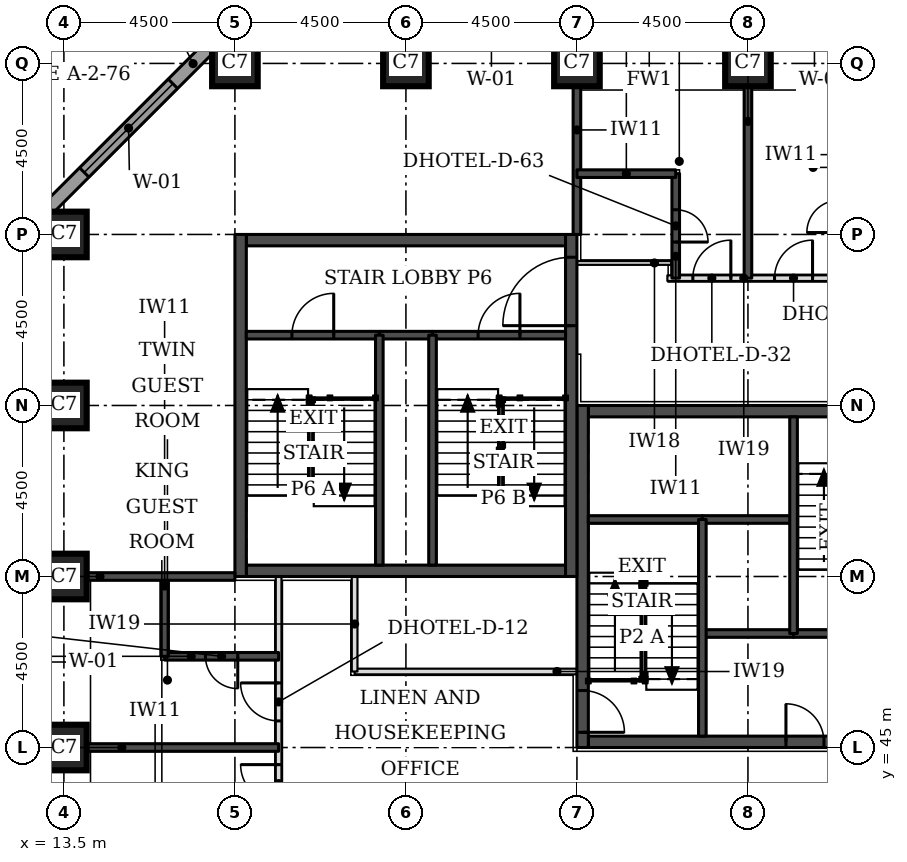
"""IFC4 building model, lengths in metres.
Left out: names, types, materials, properties, quantities, classifications, styles, units other than length and angle.
Written with IfcOpenShell. Run it as: python <this file> out.ifc"""

import sys

from ifc_helpers import new_model, si_unit, direction, frame, frame_2d, origin, origin_2d, place, context, subcontext, project, spatial, rectangle, extrude, element, fill, save


model = new_model("IFC4")
c1 = context("Model", 3, precision=1e-05, world=origin(), true_north=direction((0.0, 1.0)))
c2 = subcontext(c1, "Body", "Model", "MODEL_VIEW")
j1 = project(units=[si_unit("LENGTHUNIT", "METRE"), si_unit("PLANEANGLEUNIT", "RADIAN")], contexts=[c1])
p1 = place(None, origin())
s1 = spatial("IfcSite", under=j1, at=p1, CompositionType="ELEMENT")
p2 = place(p1, origin())
s2 = spatial("IfcBuilding", under=s1, at=p2, CompositionType="ELEMENT")
p3 = place(p2, frame((0.0, 0.0, 36.3)))
s3 = spatial("IfcBuildingStorey", under=s2, at=p3, CompositionType="ELEMENT", Elevation=36.3)
for number, where, z_axis, x_axis in (
    (1, (13.5, 45.0, 0.0), (0.0, 0.0, 1.0), (1.0, 0.0, 0.0)),
    (2, (13.5, 49.5, 0.0), (0.0, 0.0, 1.0), (1.0, 0.0, 0.0)),
    (3, (13.5, 54.0, 0.0), (0.0, 0.0, 1.0), (1.0, 0.0, 0.0)),
    (4, (13.5, 58.5, 0.0), (0.0, 0.0, 1.0), (1.0, 0.0, 0.0)),
    (5, (18.0, 63.0, 0.0), (0.0, 0.0, 1.0), (1.0, 0.0, 0.0)),
    (6, (22.5, 63.0, 0.0), (0.0, 0.0, 1.0), (1.0, 0.0, 0.0)),
    (7, (27.0, 63.0, 0.0), (0.0, 0.0, 1.0), (1.0, 0.0, 0.0)),
    (8, (31.5, 63.0, 0.0), (0.0, 0.0, 1.0), (1.0, 0.0, 0.0)),
):
    element("IfcColumn", number, at=place(p3, frame(where, z_axis=z_axis, x_axis=x_axis)), inside=s3, PredefinedType="COLUMN", context=c2, shape_type="SweptSolid", body=[
        extrude(rectangle(XDim=1.2, YDim=1.2, at=origin_2d()), origin(), (0.0, 0.0, 1.0), 3.3),
    ])
p4 = place(p3, frame((27.3, 45.15, 0.0), z_axis=(0.0, 0.0, 1.0), x_axis=(1.0, 0.0, 0.0)))
e9 = element("IfcWall", 9, at=p4, inside=s3, PredefinedType="SHEAR", context=c2, shape_type="SweptSolid", body=[
    extrude(rectangle(XDim=8.4, YDim=0.3, at=frame_2d((4.2, 0.0))), origin(), (0.0, 0.0, 1.0), 3.3),
])
p5 = place(p4, frame((5.2, 0.0, 0.0)))
e10 = element("IfcOpeningElement", 10, at=p5, cuts=e9, PredefinedType="OPENING", context=c2, shape_type="SweptSolid", body=[
    extrude(rectangle(XDim=1.0, YDim=2.1, at=frame_2d((0.5, 1.05))), frame((0.0, 0.16, 0.0), z_axis=(0.0, -1.0, 0.0), x_axis=(1.0, 0.0, 0.0)), (0.0, 0.0, 1.0), 0.32),
])
p6 = place(p3, frame((27.3, 53.85, 0.0), z_axis=(0.0, 0.0, 1.0), x_axis=(1.0, 0.0, 0.0)))
e11 = element("IfcWall", 11, at=p6, inside=s3, PredefinedType="SHEAR", context=c2, shape_type="SweptSolid", body=[
    extrude(rectangle(XDim=8.4, YDim=0.3, at=frame_2d((4.2, 0.0))), origin(), (0.0, 0.0, 1.0), 3.3),
])
p7 = place(p6, frame((6.4, 0.0, 0.0)))
e12 = element("IfcOpeningElement", 12, at=p7, cuts=e11, PredefinedType="OPENING", context=c2, shape_type="SweptSolid", body=[
    extrude(rectangle(XDim=1.1, YDim=2.1, at=frame_2d((0.55, 1.05))), frame((0.0, 0.16, 0.0), z_axis=(0.0, -1.0, 0.0), x_axis=(1.0, 0.0, 0.0)), (0.0, 0.0, 1.0), 0.32),
])
p8 = place(p3, frame((27.15, 45.0, 0.0), z_axis=(0.0, 0.0, 1.0), x_axis=(0.0, 1.0, 0.0)))
e13 = element("IfcWall", 13, at=p8, inside=s3, PredefinedType="SHEAR", context=c2, shape_type="SweptSolid", body=[
    extrude(rectangle(XDim=9.0, YDim=0.3, at=frame_2d((4.5, 0.0))), origin(), (0.0, 0.0, 1.0), 3.3),
])
p9 = place(p8, frame((0.4, 0.0, 0.0)))
e14 = element("IfcOpeningElement", 14, at=p9, cuts=e13, PredefinedType="OPENING", context=c2, shape_type="SweptSolid", body=[
    extrude(rectangle(XDim=1.1, YDim=2.1, at=frame_2d((0.55, 1.05))), frame((0.0, 0.16, 0.0), z_axis=(0.0, -1.0, 0.0), x_axis=(1.0, 0.0, 0.0)), (0.0, 0.0, 1.0), 0.32),
])
for number, where, z_axis, x_axis in (
    (15, (18.3, 49.65, 0.0), (0.0, 0.0, 1.0), (1.0, 0.0, 0.0)),
    (16, (18.3, 58.35, 0.0), (0.0, 0.0, 1.0), (1.0, 0.0, 0.0)),
):
    element("IfcWall", number, at=place(p3, frame(where, z_axis=z_axis, x_axis=x_axis)), inside=s3, PredefinedType="SHEAR", context=c2, shape_type="SweptSolid", body=[
        extrude(rectangle(XDim=8.4, YDim=0.3, at=frame_2d((4.2, 0.0))), origin(), (0.0, 0.0, 1.0), 3.3),
    ])
p10 = place(p3, frame((18.15, 49.5, 0.0), z_axis=(0.0, 0.0, 1.0), x_axis=(0.0, 1.0, 0.0)))
e17 = element("IfcWall", 17, at=p10, inside=s3, PredefinedType="SHEAR", context=c2, shape_type="SweptSolid", body=[
    extrude(rectangle(XDim=9.0, YDim=0.3, at=frame_2d((4.5, 0.0))), origin(), (0.0, 0.0, 1.0), 3.3),
])
p11 = place(p3, frame((26.85, 49.5, 0.0), z_axis=(0.0, 0.0, 1.0), x_axis=(0.0, 1.0, 0.0)))
e18 = element("IfcWall", 18, at=p11, inside=s3, PredefinedType="SHEAR", context=c2, shape_type="SweptSolid", body=[
    extrude(rectangle(XDim=9.0, YDim=0.3, at=frame_2d((4.5, 0.0))), origin(), (0.0, 0.0, 1.0), 3.3),
])
p12 = place(p11, frame((6.6, 0.0, 0.0)))
e19 = element("IfcOpeningElement", 19, at=p12, cuts=e18, PredefinedType="OPENING", context=c2, shape_type="SweptSolid", body=[
    extrude(rectangle(XDim=1.8, YDim=2.1, at=frame_2d((0.9, 1.05))), frame((0.0, 0.16, 0.0), z_axis=(0.0, -1.0, 0.0), x_axis=(1.0, 0.0, 0.0)), (0.0, 0.0, 1.0), 0.32),
])
p13 = place(p3, frame((17.73, 63.826, 0.0), z_axis=(0.0, 0.0, 1.0), x_axis=(-0.707106781187, -0.707106781187, 0.0)))
e20 = element("IfcWall", 20, at=p13, inside=s3, PredefinedType="STANDARD", context=c2, shape_type="SweptSolid", body=[
    extrude(rectangle(XDim=7.151, YDim=0.35, at=frame_2d((3.576, 0.0))), origin(), (0.0, 0.0, 1.0), 3.055),
])
p14 = place(p13, frame((1.926, 0.0, 0.8)))
e21 = element("IfcOpeningElement", 21, at=p14, cuts=e20, PredefinedType="OPENING", context=c2, shape_type="SweptSolid", body=[
    extrude(rectangle(XDim=3.3, YDim=1.5, at=frame_2d((1.65, 0.75))), frame((0.0, 0.185, 0.0), z_axis=(0.0, -1.0, 0.0), x_axis=(1.0, 0.0, 0.0)), (0.0, 0.0, 1.0), 0.37),
])
p15 = place(p3, frame((19.15, 25.15, 0.0), z_axis=(0.0, 0.0, 1.0), x_axis=(0.0, 1.0, 0.0)))
e22 = element("IfcWall", 22, at=p15, inside=s3, PredefinedType="PARTITIONING", context=c2, shape_type="SweptSolid", body=[
    extrude(rectangle(XDim=24.35, YDim=0.15, at=frame_2d((12.175, 0.0))), origin(), (0.0, 0.0, 1.0), 3.08),
])
p16 = place(p15, frame((0.4, 0.0, 0.0)))
e23 = element("IfcOpeningElement", 23, at=p16, cuts=e22, PredefinedType="OPENING", context=c2, shape_type="SweptSolid", body=[
    extrude(rectangle(XDim=1.0, YDim=2.1, at=frame_2d((0.5, 1.05))), frame((0.0, 0.085, 0.0), z_axis=(0.0, -1.0, 0.0), x_axis=(1.0, 0.0, 0.0)), (0.0, 0.0, 1.0), 0.17),
])
p17 = place(p15, frame((2.55, 0.0, 0.0)))
e24 = element("IfcOpeningElement", 24, at=p17, cuts=e22, PredefinedType="OPENING", context=c2, shape_type="SweptSolid", body=[
    extrude(rectangle(XDim=1.0, YDim=2.1, at=frame_2d((0.5, 1.05))), frame((0.0, 0.085, 0.0), z_axis=(0.0, -1.0, 0.0), x_axis=(1.0, 0.0, 0.0)), (0.0, 0.0, 1.0), 0.17),
])
p18 = place(p15, frame((9.4, 0.0, 0.0)))
e25 = element("IfcOpeningElement", 25, at=p18, cuts=e22, PredefinedType="OPENING", context=c2, shape_type="SweptSolid", body=[
    extrude(rectangle(XDim=1.0, YDim=2.1, at=frame_2d((0.5, 1.05))), frame((0.0, 0.085, 0.0), z_axis=(0.0, -1.0, 0.0), x_axis=(1.0, 0.0, 0.0)), (0.0, 0.0, 1.0), 0.17),
])
p19 = place(p15, frame((11.55, 0.0, 0.0)))
e26 = element("IfcOpeningElement", 26, at=p19, cuts=e22, PredefinedType="OPENING", context=c2, shape_type="SweptSolid", body=[
    extrude(rectangle(XDim=1.0, YDim=2.1, at=frame_2d((0.5, 1.05))), frame((0.0, 0.085, 0.0), z_axis=(0.0, -1.0, 0.0), x_axis=(1.0, 0.0, 0.0)), (0.0, 0.0, 1.0), 0.17),
])
p20 = place(p15, frame((18.4, 0.0, 0.0)))
e27 = element("IfcOpeningElement", 27, at=p20, cuts=e22, PredefinedType="OPENING", context=c2, shape_type="SweptSolid", body=[
    extrude(rectangle(XDim=1.0, YDim=2.1, at=frame_2d((0.5, 1.05))), frame((0.0, 0.085, 0.0), z_axis=(0.0, -1.0, 0.0), x_axis=(1.0, 0.0, 0.0)), (0.0, 0.0, 1.0), 0.17),
])
p21 = place(p15, frame((20.55, 0.0, 0.0)))
e28 = element("IfcOpeningElement", 28, at=p21, cuts=e22, PredefinedType="OPENING", context=c2, shape_type="SweptSolid", body=[
    extrude(rectangle(XDim=1.0, YDim=2.1, at=frame_2d((0.5, 1.05))), frame((0.0, 0.085, 0.0), z_axis=(0.0, -1.0, 0.0), x_axis=(1.0, 0.0, 0.0)), (0.0, 0.0, 1.0), 0.17),
])
p22 = place(p3, frame((21.15, 47.0, 0.0), z_axis=(0.0, 0.0, 1.0), x_axis=(1.0, 0.0, 0.0)))
e29 = element("IfcWall", 29, at=p22, inside=s3, PredefinedType="PARTITIONING", context=c2, shape_type="SweptSolid", body=[
    extrude(rectangle(XDim=5.85, YDim=0.15, at=frame_2d((2.925, 0.0))), origin(), (0.0, 0.0, 1.0), 3.08),
])
p23 = place(p3, frame((21.15, 47.0, 0.0), z_axis=(0.0, 0.0, 1.0), x_axis=(0.0, 1.0, 0.0)))
e30 = element("IfcWall", 30, at=p23, inside=s3, PredefinedType="PARTITIONING", context=c2, shape_type="SweptSolid", body=[
    extrude(rectangle(XDim=2.5, YDim=0.15, at=frame_2d((1.25, 0.0))), origin(), (0.0, 0.0, 1.0), 3.08),
])
p24 = place(p3, frame((29.38, 57.35, 0.0), z_axis=(0.0, 0.0, 1.0), x_axis=(1.0, 0.0, 0.0)))
e31 = element("IfcWall", 31, at=p24, inside=s3, PredefinedType="PARTITIONING", context=c2, shape_type="SweptSolid", body=[
    extrude(rectangle(XDim=13.62, YDim=0.15, at=frame_2d((6.81, 0.0))), origin(), (0.0, 0.0, 1.0), 3.08),
])
p25 = place(p24, frame((2.82, 0.0, 0.0)))
e32 = element("IfcOpeningElement", 32, at=p25, cuts=e31, PredefinedType="OPENING", context=c2, shape_type="SweptSolid", body=[
    extrude(rectangle(XDim=1.0, YDim=2.1, at=frame_2d((0.5, 1.05))), frame((0.0, 0.085, 0.0), z_axis=(0.0, -1.0, 0.0), x_axis=(1.0, 0.0, 0.0)), (0.0, 0.0, 1.0), 0.17),
])
p26 = place(p24, frame((0.67, 0.0, 0.0)))
e33 = element("IfcOpeningElement", 33, at=p26, cuts=e31, PredefinedType="OPENING", context=c2, shape_type="SweptSolid", body=[
    extrude(rectangle(XDim=1.0, YDim=2.1, at=frame_2d((0.5, 1.05))), frame((0.0, 0.085, 0.0), z_axis=(0.0, -1.0, 0.0), x_axis=(1.0, 0.0, 0.0)), (0.0, 0.0, 1.0), 0.17),
])
p27 = place(p24, frame((9.67, 0.0, 0.0)))
e34 = element("IfcOpeningElement", 34, at=p27, cuts=e31, PredefinedType="OPENING", context=c2, shape_type="SweptSolid", body=[
    extrude(rectangle(XDim=0.9, YDim=2.1, at=frame_2d((0.45, 1.05))), frame((0.0, 0.085, 0.0), z_axis=(0.0, -1.0, 0.0), x_axis=(1.0, 0.0, 0.0)), (0.0, 0.0, 1.0), 0.17),
])
p28 = place(p3, frame((14.1, 45.0, 0.0), z_axis=(0.0, 0.0, 1.0), x_axis=(1.0, 0.0, 0.0)))
e35 = element("IfcWall", 35, at=p28, inside=s3, PredefinedType="SOLIDWALL", context=c2, shape_type="SweptSolid", body=[
    extrude(rectangle(XDim=5.05, YDim=0.2, at=frame_2d((2.525, 0.0))), origin(), (0.0, 0.0, 1.0), 3.08),
])
p29 = place(p3, frame((16.15, 47.4, 0.0), z_axis=(0.0, 0.0, 1.0), x_axis=(1.0, 0.0, 0.0)))
e36 = element("IfcWall", 36, at=p29, inside=s3, PredefinedType="SOLIDWALL", context=c2, shape_type="SweptSolid", body=[
    extrude(rectangle(XDim=3.0, YDim=0.2, at=frame_2d((1.5, 0.0))), origin(), (0.0, 0.0, 1.0), 3.08),
])
p30 = place(p29, frame((1.075, 0.0, 0.0)))
e37 = element("IfcOpeningElement", 37, at=p30, cuts=e36, PredefinedType="OPENING", context=c2, shape_type="SweptSolid", body=[
    extrude(rectangle(XDim=0.85, YDim=2.1, at=frame_2d((0.425, 1.05))), frame((0.0, 0.11, 0.0), z_axis=(0.0, -1.0, 0.0), x_axis=(1.0, 0.0, 0.0)), (0.0, 0.0, 1.0), 0.22),
])
p31 = place(p3, frame((16.15, 47.4, 0.0), z_axis=(0.0, 0.0, 1.0), x_axis=(0.0, 1.0, 0.0)))
e38 = element("IfcWall", 38, at=p31, inside=s3, PredefinedType="SOLIDWALL", context=c2, shape_type="SweptSolid", body=[
    extrude(rectangle(XDim=2.1, YDim=0.2, at=frame_2d((1.05, 0.0))), origin(), (0.0, 0.0, 1.0), 3.08),
])
for number, where, z_axis, x_axis in (
    (39, (14.1, 49.5, 0.0), (0.0, 0.0, 1.0), (1.0, 0.0, 0.0)),
    (40, (27.0, 58.5, 0.0), (0.0, 0.0, 1.0), (0.0, 1.0, 0.0)),
):
    element("IfcWall", number, at=place(p3, frame(where, z_axis=z_axis, x_axis=x_axis)), inside=s3, PredefinedType="SOLIDWALL", context=c2, shape_type="SweptSolid", body=[
        extrude(rectangle(XDim=3.9, YDim=0.2, at=frame_2d((1.95, 0.0))), origin(), (0.0, 0.0, 1.0), 3.08),
    ])
p32 = place(p3, frame((29.6, 57.35, 0.0), z_axis=(0.0, 0.0, 1.0), x_axis=(0.0, 1.0, 0.0)))
e41 = element("IfcWall", 41, at=p32, inside=s3, PredefinedType="SOLIDWALL", context=c2, shape_type="SweptSolid", body=[
    extrude(rectangle(XDim=2.75, YDim=0.2, at=frame_2d((1.375, 0.0))), origin(), (0.0, 0.0, 1.0), 3.08),
])
p33 = place(p32, frame((0.95, 0.0, 0.0)))
e42 = element("IfcOpeningElement", 42, at=p33, cuts=e41, PredefinedType="OPENING", context=c2, shape_type="SweptSolid", body=[
    extrude(rectangle(XDim=0.85, YDim=2.1, at=frame_2d((0.425, 1.05))), frame((0.0, 0.11, 0.0), z_axis=(0.0, -1.0, 0.0), x_axis=(1.0, 0.0, 0.0)), (0.0, 0.0, 1.0), 0.22),
])
p34 = place(p3, frame((31.5, 57.35, 0.0), z_axis=(0.0, 0.0, 1.0), x_axis=(0.0, 1.0, 0.0)))
e43 = element("IfcWall", 43, at=p34, inside=s3, PredefinedType="SOLIDWALL", context=c2, shape_type="SweptSolid", body=[
    extrude(rectangle(XDim=5.05, YDim=0.2, at=frame_2d((2.525, 0.0))), origin(), (0.0, 0.0, 1.0), 3.08),
])
p35 = place(p3, frame((27.0, 60.1, 0.0), z_axis=(0.0, 0.0, 1.0), x_axis=(1.0, 0.0, 0.0)))
e44 = element("IfcWall", 44, at=p35, inside=s3, PredefinedType="SOLIDWALL", context=c2, shape_type="SweptSolid", body=[
    extrude(rectangle(XDim=2.6, YDim=0.2, at=frame_2d((1.3, 0.0))), origin(), (0.0, 0.0, 1.0), 3.08),
])
p36 = place(p3, frame((27.0, 57.75, 0.0), z_axis=(0.0, 0.0, 1.0), x_axis=(1.0, 0.0, 0.0)))
e45 = element("IfcWall", 45, at=p36, inside=s3, PredefinedType="PARTITIONING", context=c2, shape_type="SweptSolid", body=[
    extrude(rectangle(XDim=2.48, YDim=0.1, at=frame_2d((1.24, 0.0))), origin(), (0.0, 0.0, 1.0), 3.08),
])
p37 = place(p3, frame((30.3, 48.0, 0.0), z_axis=(0.0, 0.0, 1.0), x_axis=(1.0, 0.0, 0.0)))
e46 = element("IfcWall", 46, at=p37, inside=s3, PredefinedType="SOLIDWALL", context=c2, shape_type="SweptSolid", body=[
    extrude(rectangle(XDim=2.4, YDim=0.2, at=frame_2d((1.2, 0.0))), origin(), (0.0, 0.0, 1.0), 3.08),
])
p38 = place(p3, frame((32.7, 48.0, 0.0), z_axis=(0.0, 0.0, 1.0), x_axis=(1.0, 0.0, 0.0)))
e47 = element("IfcWall", 47, at=p38, inside=s3, PredefinedType="SOLIDWALL", context=c2, shape_type="SweptSolid", body=[
    extrude(rectangle(XDim=3.0, YDim=0.2, at=frame_2d((1.5, 0.0))), origin(), (0.0, 0.0, 1.0), 3.08),
])
p39 = place(p3, frame((30.3, 51.0, 0.0), z_axis=(0.0, 0.0, 1.0), x_axis=(1.0, 0.0, 0.0)))
e48 = element("IfcWall", 48, at=p39, inside=s3, PredefinedType="SOLIDWALL", context=c2, shape_type="SweptSolid", body=[
    extrude(rectangle(XDim=2.4, YDim=0.2, at=frame_2d((1.2, 0.0))), origin(), (0.0, 0.0, 1.0), 3.3),
])
p40 = place(p3, frame((27.3, 51.0, 0.0), z_axis=(0.0, 0.0, 1.0), x_axis=(1.0, 0.0, 0.0)))
e49 = element("IfcWall", 49, at=p40, inside=s3, PredefinedType="SOLIDWALL", context=c2, shape_type="SweptSolid", body=[
    extrude(rectangle(XDim=3.0, YDim=0.2, at=frame_2d((1.5, 0.0))), origin(), (0.0, 0.0, 1.0), 3.08),
])
for number, where, z_axis, x_axis in (
    (50, (30.3, 45.3, 0.0), (0.0, 0.0, 1.0), (0.0, 1.0, 0.0)),
    (51, (32.7, 48.0, 0.0), (0.0, 0.0, 1.0), (0.0, 1.0, 0.0)),
):
    element("IfcWall", number, at=place(p3, frame(where, z_axis=z_axis, x_axis=x_axis)), inside=s3, PredefinedType="SOLIDWALL", context=c2, shape_type="SweptSolid", body=[
        extrude(rectangle(XDim=5.7, YDim=0.2, at=frame_2d((2.85, 0.0))), origin(), (0.0, 0.0, 1.0), 3.08),
    ])
p41 = place(p3, frame((21.8, 55.85, 0.0), z_axis=(0.0, 0.0, 1.0), x_axis=(1.0, 0.0, 0.0)))
e52 = element("IfcWall", 52, at=p41, inside=s3, PredefinedType="SOLIDWALL", context=c2, shape_type="SweptSolid", body=[
    extrude(rectangle(XDim=1.4, YDim=0.2, at=frame_2d((0.7, 0.0))), origin(), (0.0, 0.0, 1.0), 3.08),
])
p42 = place(p3, frame((18.3, 55.85, 0.0), z_axis=(0.0, 0.0, 1.0), x_axis=(1.0, 0.0, 0.0)))
e53 = element("IfcWall", 53, at=p42, inside=s3, PredefinedType="SOLIDWALL", context=c2, shape_type="SweptSolid", body=[
    extrude(rectangle(XDim=3.5, YDim=0.2, at=frame_2d((1.75, 0.0))), origin(), (0.0, 0.0, 1.0), 3.08),
])
p43 = place(p42, frame((1.2, 0.0, 0.0)))
e54 = element("IfcOpeningElement", 54, at=p43, cuts=e53, PredefinedType="OPENING", context=c2, shape_type="SweptSolid", body=[
    extrude(rectangle(XDim=1.1, YDim=2.1, at=frame_2d((0.55, 1.05))), frame((0.0, 0.11, 0.0), z_axis=(0.0, -1.0, 0.0), x_axis=(1.0, 0.0, 0.0)), (0.0, 0.0, 1.0), 0.22),
])
p44 = place(p3, frame((23.2, 55.85, 0.0), z_axis=(0.0, 0.0, 1.0), x_axis=(1.0, 0.0, 0.0)))
e55 = element("IfcWall", 55, at=p44, inside=s3, PredefinedType="SOLIDWALL", context=c2, shape_type="SweptSolid", body=[
    extrude(rectangle(XDim=3.5, YDim=0.2, at=frame_2d((1.75, 0.0))), origin(), (0.0, 0.0, 1.0), 3.08),
])
p45 = place(p44, frame((1.2, 0.0, 0.0)))
e56 = element("IfcOpeningElement", 56, at=p45, cuts=e55, PredefinedType="OPENING", context=c2, shape_type="SweptSolid", body=[
    extrude(rectangle(XDim=1.1, YDim=2.1, at=frame_2d((0.55, 1.05))), frame((0.0, 0.11, 0.0), z_axis=(0.0, -1.0, 0.0), x_axis=(1.0, 0.0, 0.0)), (0.0, 0.0, 1.0), 0.22),
])
for number, where, z_axis, x_axis in (
    (57, (21.8, 49.8, 0.0), (0.0, 0.0, 1.0), (0.0, 1.0, 0.0)),
    (58, (23.2, 49.8, 0.0), (0.0, 0.0, 1.0), (0.0, 1.0, 0.0)),
):
    element("IfcWall", number, at=place(p3, frame(where, z_axis=z_axis, x_axis=x_axis)), inside=s3, PredefinedType="SOLIDWALL", context=c2, shape_type="SweptSolid", body=[
        extrude(rectangle(XDim=6.05, YDim=0.2, at=frame_2d((3.025, 0.0))), origin(), (0.0, 0.0, 1.0), 3.08),
    ])
p46 = place(p14, origin())
e59 = element("IfcWindow", 59, at=p46, inside=s3, PartitioningType="SINGLE_PANEL", PredefinedType="WINDOW", context=c2, shape_type="SweptSolid", body=[
    extrude(rectangle(XDim=3.3, YDim=1.5, at=frame_2d((1.65, 0.75))), frame((0.0, 0.085, 0.0), z_axis=(0.0, -1.0, 0.0), x_axis=(1.0, 0.0, 0.0)), (0.0, 0.0, 1.0), 0.06),
])
fill(e21, e59)
p47 = place(p20, origin())
e60 = element("IfcDoor", 60, at=p47, inside=s3, OperationType="SINGLE_SWING_RIGHT", PredefinedType="DOOR", context=c2, shape_type="SweptSolid", body=[
    extrude(rectangle(XDim=1.0, YDim=2.1, at=frame_2d((0.5, 1.05))), frame((0.0, 0.025, 0.0), z_axis=(0.0, -1.0, 0.0), x_axis=(1.0, 0.0, 0.0)), (0.0, 0.0, 1.0), 0.05),
])
fill(e27, e60)
p48 = place(p21, origin())
e61 = element("IfcDoor", 61, at=p48, inside=s3, OperationType="SINGLE_SWING_RIGHT", PredefinedType="DOOR", context=c2, shape_type="SweptSolid", body=[
    extrude(rectangle(XDim=1.0, YDim=2.1, at=frame_2d((0.5, 1.05))), frame((0.0, 0.025, 0.0), z_axis=(0.0, -1.0, 0.0), x_axis=(1.0, 0.0, 0.0)), (0.0, 0.0, 1.0), 0.05),
])
fill(e28, e61)
p49 = place(p30, frame((0.85, 0.0, 0.0), z_axis=(0.0, 0.0, 1.0), x_axis=(-1.0, 0.0, 0.0)))
e62 = element("IfcDoor", 62, at=p49, inside=s3, OperationType="SINGLE_SWING_LEFT", PredefinedType="DOOR", context=c2, shape_type="SweptSolid", body=[
    extrude(rectangle(XDim=0.85, YDim=2.1, at=frame_2d((0.425, 1.05))), frame((0.0, 0.025, 0.0), z_axis=(0.0, -1.0, 0.0), x_axis=(1.0, 0.0, 0.0)), (0.0, 0.0, 1.0), 0.05),
])
fill(e37, e62)
p50 = place(p25, origin())
e63 = element("IfcDoor", 63, at=p50, inside=s3, OperationType="SINGLE_SWING_RIGHT", PredefinedType="DOOR", context=c2, shape_type="SweptSolid", body=[
    extrude(rectangle(XDim=1.0, YDim=2.1, at=frame_2d((0.5, 1.05))), frame((0.0, 0.025, 0.0), z_axis=(0.0, -1.0, 0.0), x_axis=(1.0, 0.0, 0.0)), (0.0, 0.0, 1.0), 0.05),
])
fill(e32, e63)
p51 = place(p26, origin())
e64 = element("IfcDoor", 64, at=p51, inside=s3, OperationType="SINGLE_SWING_RIGHT", PredefinedType="DOOR", context=c2, shape_type="SweptSolid", body=[
    extrude(rectangle(XDim=1.0, YDim=2.1, at=frame_2d((0.5, 1.05))), frame((0.0, 0.025, 0.0), z_axis=(0.0, -1.0, 0.0), x_axis=(1.0, 0.0, 0.0)), (0.0, 0.0, 1.0), 0.05),
])
fill(e33, e64)
p52 = place(p33, frame((0.85, 0.0, 0.0), z_axis=(0.0, 0.0, 1.0), x_axis=(-1.0, 0.0, 0.0)))
e65 = element("IfcDoor", 65, at=p52, inside=s3, OperationType="SINGLE_SWING_RIGHT", PredefinedType="DOOR", context=c2, shape_type="SweptSolid", body=[
    extrude(rectangle(XDim=0.85, YDim=2.1, at=frame_2d((0.425, 1.05))), frame((0.0, 0.025, 0.0), z_axis=(0.0, -1.0, 0.0), x_axis=(1.0, 0.0, 0.0)), (0.0, 0.0, 1.0), 0.05),
])
fill(e42, e65)
p53 = place(p9, frame((1.1, 0.0, 0.0), z_axis=(0.0, 0.0, 1.0), x_axis=(-1.0, 0.0, 0.0)))
e66 = element("IfcDoor", 66, at=p53, inside=s3, OperationType="SINGLE_SWING_RIGHT", PredefinedType="DOOR", context=c2, shape_type="SweptSolid", body=[
    extrude(rectangle(XDim=1.1, YDim=2.1, at=frame_2d((0.55, 1.05))), frame((0.0, 0.025, 0.0), z_axis=(0.0, -1.0, 0.0), x_axis=(1.0, 0.0, 0.0)), (0.0, 0.0, 1.0), 0.05),
])
fill(e14, e66)
p54 = place(p5, origin())
e67 = element("IfcDoor", 67, at=p54, inside=s3, OperationType="SINGLE_SWING_LEFT", PredefinedType="DOOR", context=c2, shape_type="SweptSolid", body=[
    extrude(rectangle(XDim=1.0, YDim=2.1, at=frame_2d((0.5, 1.05))), frame((0.0, 0.025, 0.0), z_axis=(0.0, -1.0, 0.0), x_axis=(1.0, 0.0, 0.0)), (0.0, 0.0, 1.0), 0.05),
])
fill(e10, e67)
p55 = place(p43, origin())
e68 = element("IfcDoor", 68, at=p55, inside=s3, OperationType="SINGLE_SWING_RIGHT", PredefinedType="DOOR", context=c2, shape_type="SweptSolid", body=[
    extrude(rectangle(XDim=1.1, YDim=2.1, at=frame_2d((0.55, 1.05))), frame((0.0, 0.025, 0.0), z_axis=(0.0, -1.0, 0.0), x_axis=(1.0, 0.0, 0.0)), (0.0, 0.0, 1.0), 0.05),
])
fill(e54, e68)
p56 = place(p45, origin())
e69 = element("IfcDoor", 69, at=p56, inside=s3, OperationType="SINGLE_SWING_RIGHT", PredefinedType="DOOR", context=c2, shape_type="SweptSolid", body=[
    extrude(rectangle(XDim=1.1, YDim=2.1, at=frame_2d((0.55, 1.05))), frame((0.0, 0.025, 0.0), z_axis=(0.0, -1.0, 0.0), x_axis=(1.0, 0.0, 0.0)), (0.0, 0.0, 1.0), 0.05),
])
fill(e56, e69)
p57 = place(p12, origin())
e70 = element("IfcDoor", 70, at=p57, inside=s3, OperationType="SINGLE_SWING_LEFT", PredefinedType="DOOR", context=c2, shape_type="SweptSolid", body=[
    extrude(rectangle(XDim=1.8, YDim=2.1, at=frame_2d((0.9, 1.05))), frame((0.0, 0.025, 0.0), z_axis=(0.0, -1.0, 0.0), x_axis=(1.0, 0.0, 0.0)), (0.0, 0.0, 1.0), 0.05),
])
fill(e19, e70)
save(model, sys.argv[1])
